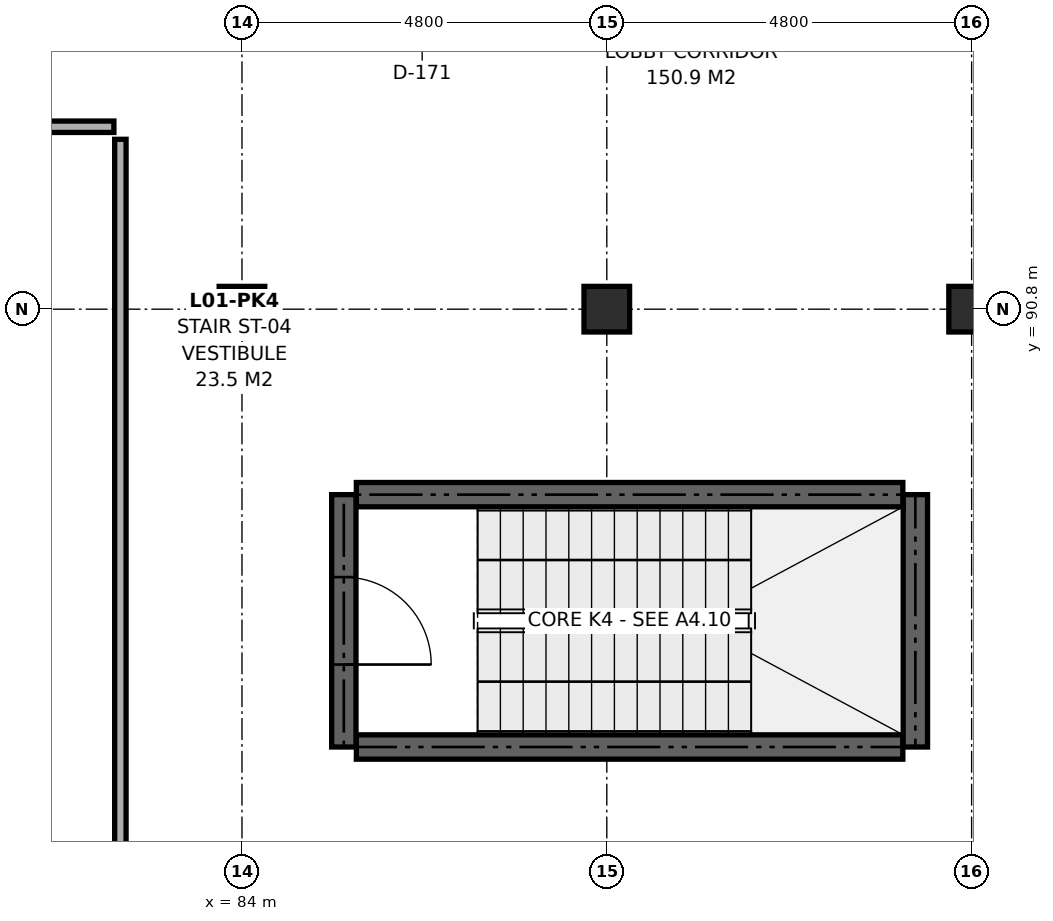
"""IFC4 building model, lengths in metres.
Left out: names, types, materials, properties, quantities, classifications, styles, units other than length and angle.
Written with IfcOpenShell. Run it as: python <this file> out.ifc"""

import sys

from ifc_helpers import new_model, si_unit, direction, frame, frame_2d, origin, origin_2d, place, context, subcontext, project, spatial, rectangle, extrude, element, fill, save


model = new_model("IFC4")
c1 = context("Model", 3, precision=1e-05, world=origin(), true_north=direction((0.0, 1.0)))
c2 = subcontext(c1, "Body", "Model", "MODEL_VIEW")
j1 = project(units=[si_unit("LENGTHUNIT", "METRE"), si_unit("PLANEANGLEUNIT", "RADIAN")], contexts=[c1])
p1 = place(None, origin())
s1 = spatial("IfcSite", under=j1, at=p1, CompositionType="ELEMENT")
p2 = place(p1, origin())
s2 = spatial("IfcBuilding", under=s1, at=p2, CompositionType="ELEMENT")
p3 = place(p2, frame((0.0, 0.0, 5.0)))
s3 = spatial("IfcBuildingStorey", under=s2, at=p3, CompositionType="ELEMENT", Elevation=5.0)
for number, where, z_axis, x_axis in (
    (1, (84.0, 90.8, 0.0), (0.0, 0.0, 1.0), (1.0, 0.0, 0.0)),
    (2, (88.8, 90.8, 0.0), (0.0, 0.0, 1.0), (1.0, 0.0, 0.0)),
    (3, (93.6, 90.8, 0.0), (0.0, 0.0, 1.0), (1.0, 0.0, 0.0)),
):
    element("IfcColumn", number, at=place(p3, frame(where, z_axis=z_axis, x_axis=x_axis)), inside=s3, PredefinedType="COLUMN", context=c2, shape_type="SweptSolid", body=[
        extrude(rectangle(XDim=0.6, YDim=0.6, at=origin_2d()), origin(), (0.0, 0.0, 1.0), 4.2),
    ])
p4 = place(p3, frame((85.505, 85.04, 0.0), z_axis=(0.0, 0.0, 1.0), x_axis=(1.0, 0.0, 0.0)))
e4 = element("IfcWall", 4, at=p4, inside=s3, PredefinedType="SHEAR", context=c2, shape_type="SweptSolid", body=[
    extrude(rectangle(XDim=7.19, YDim=0.32, at=frame_2d((3.595, 0.0))), origin(), (0.0, 0.0, 1.0), 4.2),
])
p5 = place(p3, frame((92.86, 85.04, 0.0), z_axis=(0.0, 0.0, 1.0), x_axis=(0.0, 1.0, 0.0)))
e5 = element("IfcWall", 5, at=p5, inside=s3, PredefinedType="SHEAR", context=c2, shape_type="SweptSolid", body=[
    extrude(rectangle(XDim=3.32, YDim=0.32, at=frame_2d((1.66, 0.0))), origin(), (0.0, 0.0, 1.0), 4.2),
])
p6 = place(p3, frame((92.695, 88.36, 0.0), z_axis=(0.0, 0.0, 1.0), x_axis=(-1.0, 0.0, 0.0)))
e6 = element("IfcWall", 6, at=p6, inside=s3, PredefinedType="SHEAR", context=c2, shape_type="SweptSolid", body=[
    extrude(rectangle(XDim=7.19, YDim=0.32, at=frame_2d((3.595, 0.0))), origin(), (0.0, 0.0, 1.0), 4.2),
])
p7 = place(p3, frame((85.34, 88.36, 0.0), z_axis=(0.0, 0.0, 1.0), x_axis=(0.0, -1.0, 0.0)))
e7 = element("IfcWall", 7, at=p7, inside=s3, PredefinedType="SHEAR", context=c2, shape_type="SweptSolid", body=[
    extrude(rectangle(XDim=3.32, YDim=0.32, at=frame_2d((1.66, 0.0))), origin(), (0.0, 0.0, 1.0), 4.2),
])
p8 = place(p7, frame((1.085, 0.0, 0.0)))
e8 = element("IfcOpeningElement", 8, at=p8, cuts=e7, PredefinedType="OPENING", context=c2, shape_type="SweptSolid", body=[
    extrude(rectangle(XDim=1.15, YDim=2.15, at=frame_2d((0.575, 1.075))), frame((0.0, 0.172, 0.0), z_axis=(0.0, -1.0, 0.0), x_axis=(1.0, 0.0, 0.0)), (0.0, 0.0, 1.0), 0.344),
])
p9 = place(p3, frame((75.127, 93.2, 0.0), z_axis=(0.0, 0.0, 1.0), x_axis=(1.0, 0.0, 0.0)))
e9 = element("IfcWall", 9, at=p9, inside=s3, PredefinedType="PARTITIONING", context=c2, shape_type="SweptSolid", body=[
    extrude(rectangle(XDim=7.188, YDim=0.15, at=frame_2d((3.594, 0.0))), origin(), (0.0, 0.0, 1.0), 3.485),
])
p10 = place(p9, frame((2.874, 0.0, 0.0)))
e10 = element("IfcOpeningElement", 10, at=p10, cuts=e9, PredefinedType="OPENING", context=c2, shape_type="SweptSolid", body=[
    extrude(rectangle(XDim=1.44, YDim=2.32, at=frame_2d((0.72, 1.16))), frame((0.0, 0.087, 0.0), z_axis=(0.0, -1.0, 0.0), x_axis=(1.0, 0.0, 0.0)), (0.0, 0.0, 1.0), 0.174),
])
p11 = place(p3, frame((82.4, 83.402, 0.0), z_axis=(0.0, 0.0, 1.0), x_axis=(0.0, 1.0, 0.0)))
e11 = element("IfcWall", 11, at=p11, inside=s3, PredefinedType="PARTITIONING", context=c2, shape_type="SweptSolid", body=[
    extrude(rectangle(XDim=9.633, YDim=0.15, at=frame_2d((4.816, 0.0))), origin(), (0.0, 0.0, 1.0), 3.535),
])
p12 = place(p8, origin())
e12 = element("IfcDoor", 12, at=p12, inside=s3, OperationType="SINGLE_SWING_RIGHT", PredefinedType="DOOR", context=c2, shape_type="SweptSolid", body=[
    extrude(rectangle(XDim=1.15, YDim=2.15, at=frame_2d((0.575, 1.075))), frame((0.0, 0.025, 0.0), z_axis=(0.0, -1.0, 0.0), x_axis=(1.0, 0.0, 0.0)), (0.0, 0.0, 1.0), 0.05),
])
fill(e8, e12)
save(model, sys.argv[1])
